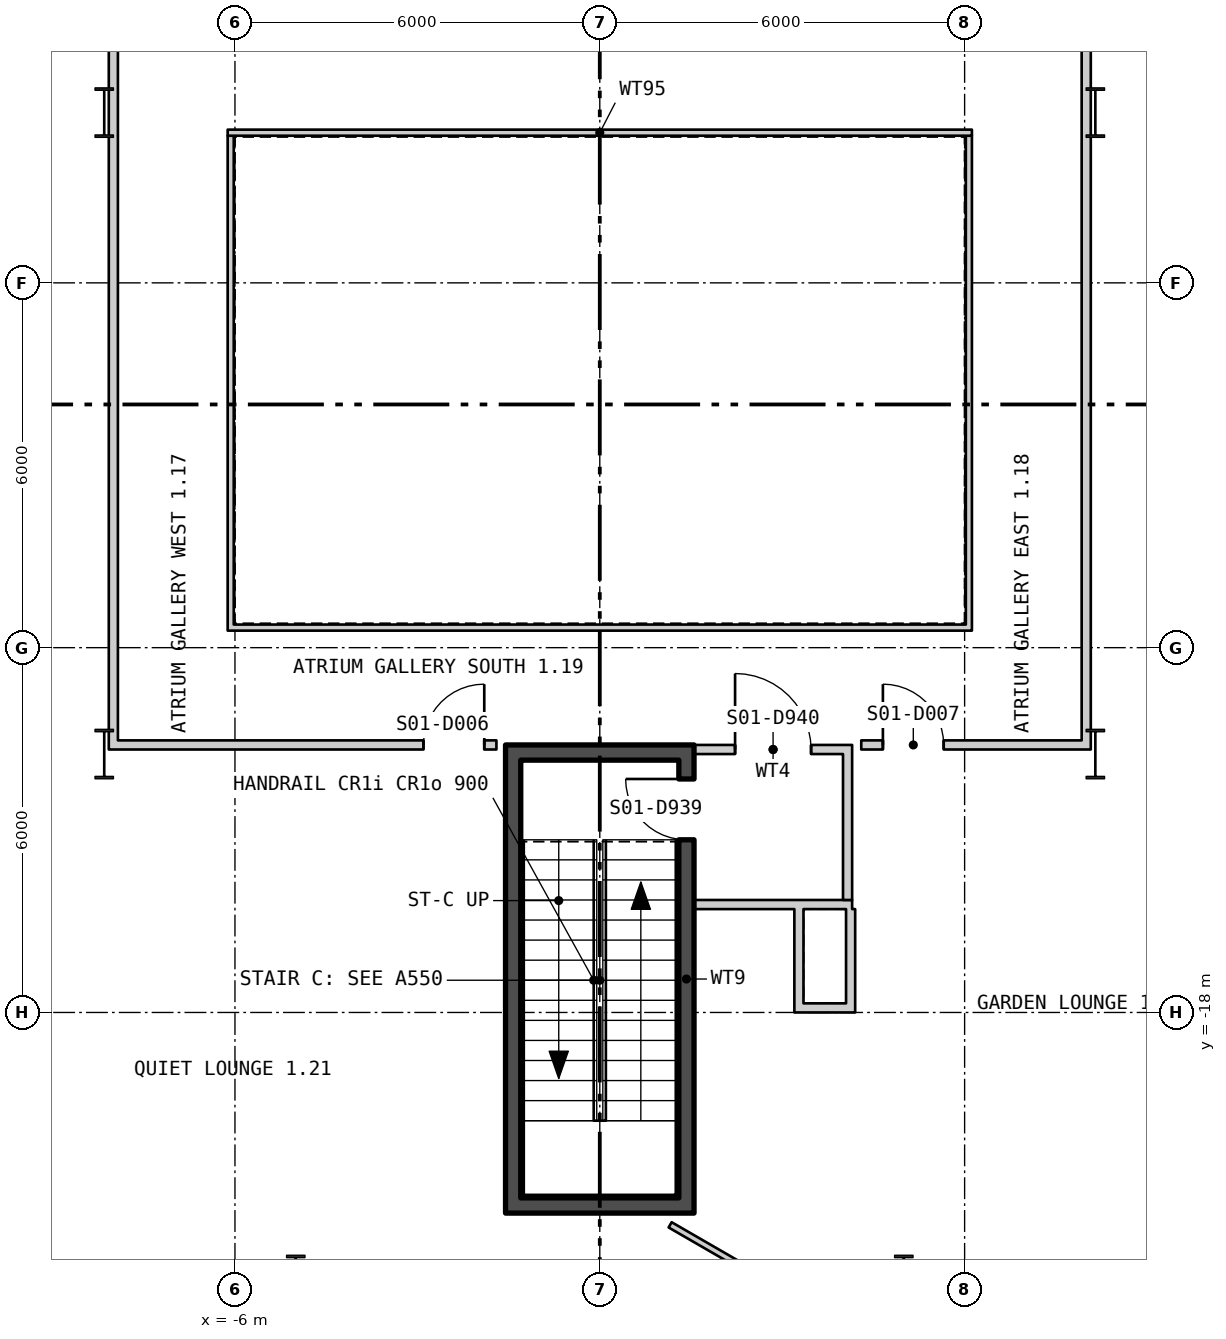
"""IFC4 building model, lengths in metres.
Left out: names, types, materials, properties, quantities, classifications, styles, units other than length and angle.
Written with IfcOpenShell. Run it as: python <this file> out.ifc"""

import sys

from ifc_helpers import new_model, si_unit, direction, frame, frame_2d, origin, origin_2d, place, context, subcontext, project, spatial, polyline, rectangle, i_section, outline, extrude, element, fill, save


model = new_model("IFC4")
c1 = context("Model", 3, precision=1e-05, world=origin(), true_north=direction((0.0, 1.0)))
c2 = subcontext(c1, "Body", "Model", "MODEL_VIEW")
j1 = project(units=[si_unit("LENGTHUNIT", "METRE"), si_unit("PLANEANGLEUNIT", "RADIAN")], contexts=[c1])
p1 = place(None, origin())
s1 = spatial("IfcSite", under=j1, at=p1, CompositionType="ELEMENT")
p2 = place(p1, origin())
s2 = spatial("IfcBuilding", under=s1, at=p2, CompositionType="ELEMENT")
p3 = place(p2, frame((0.0, 0.0, 28.8)))
s3 = spatial("IfcBuildingStorey", under=s2, at=p3, CompositionType="ELEMENT", Elevation=28.8)
for number, where, z_axis, x_axis in (
    (1, (8.15, -3.2, 0.0), (0.0, 0.0, 1.0), (1.0, 0.0, 0.0)),
    (2, (-8.15, -3.2, 0.0), (0.0, 0.0, 1.0), (1.0, 0.0, 0.0)),
    (3, (8.15, -13.75, 0.0), (0.0, 0.0, 1.0), (1.0, 0.0, 0.0)),
    (4, (-8.15, -13.75, 0.0), (0.0, 0.0, 1.0), (1.0, 0.0, 0.0)),
    (5, (5.0, -22.4, 0.0), (0.0, 0.0, 1.0), (1.0, 0.0, 0.0)),
    (6, (-5.0, -22.4, 0.0), (0.0, 0.0, 1.0), (1.0, 0.0, 0.0)),
):
    element("IfcColumn", number, at=place(p3, frame(where, z_axis=z_axis, x_axis=x_axis)), inside=s3, PredefinedType="COLUMN", context=c2, shape_type="SweptSolid", body=[
        extrude(i_section(OverallWidth=0.303, OverallDepth=0.814, WebThickness=0.021, FlangeThickness=0.04, at=origin_2d()), origin(), (0.0, 0.0, 1.0), 4.5),
    ])
p4 = place(p3, frame((-28.74, 9.808, -0.23), z_axis=(0.0, 0.0, 1.0), x_axis=(0.499999764979, -0.866025539474, 0.0)))
e7 = element("IfcWall", 7, at=p4, inside=s3, PredefinedType="SOLIDWALL", context=c2, shape_type="SweptSolid", body=[
    extrude(outline(polyline([(-0.13, -0.225), (45.87, -0.225), (45.61, 0.225), (0.13, 0.225), (-0.13, -0.225)])), origin(), (0.0, 0.0, 1.0), 4.55),
])
p5 = place(p4, frame((1.724, 0.0, 0.23)))
e8 = element("IfcOpeningElement", 8, at=p5, cuts=e7, PredefinedType="OPENING", context=c2, shape_type="SweptSolid", body=[
    extrude(rectangle(XDim=1.8, YDim=2.4, at=frame_2d((0.9, 1.2))), frame((0.0, 0.235, 0.0), z_axis=(0.0, -1.0, 0.0), x_axis=(1.0, 0.0, 0.0)), (0.0, 0.0, 1.0), 0.47),
])
p6 = place(p4, frame((5.893, 0.0, 1.13)))
e9 = element("IfcOpeningElement", 9, at=p6, cuts=e7, PredefinedType="OPENING", context=c2, shape_type="SweptSolid", body=[
    extrude(rectangle(XDim=2.4, YDim=2.6, at=frame_2d((1.2, 1.3))), frame((0.0, 0.235, 0.0), z_axis=(0.0, -1.0, 0.0), x_axis=(1.0, 0.0, 0.0)), (0.0, 0.0, 1.0), 0.47),
])
p7 = place(p4, frame((10.401, 0.0, 1.13)))
e10 = element("IfcOpeningElement", 10, at=p7, cuts=e7, PredefinedType="OPENING", context=c2, shape_type="SweptSolid", body=[
    extrude(rectangle(XDim=2.4, YDim=2.6, at=frame_2d((1.2, 1.3))), frame((0.0, 0.235, 0.0), z_axis=(0.0, -1.0, 0.0), x_axis=(1.0, 0.0, 0.0)), (0.0, 0.0, 1.0), 0.47),
])
p8 = place(p4, frame((14.909, 0.0, 1.13)))
e11 = element("IfcOpeningElement", 11, at=p8, cuts=e7, PredefinedType="OPENING", context=c2, shape_type="SweptSolid", body=[
    extrude(rectangle(XDim=2.4, YDim=2.6, at=frame_2d((1.2, 1.3))), frame((0.0, 0.235, 0.0), z_axis=(0.0, -1.0, 0.0), x_axis=(1.0, 0.0, 0.0)), (0.0, 0.0, 1.0), 0.47),
])
p9 = place(p4, frame((19.416, 0.0, 1.13)))
e12 = element("IfcOpeningElement", 12, at=p9, cuts=e7, PredefinedType="OPENING", context=c2, shape_type="SweptSolid", body=[
    extrude(rectangle(XDim=2.4, YDim=2.6, at=frame_2d((1.2, 1.3))), frame((0.0, 0.235, 0.0), z_axis=(0.0, -1.0, 0.0), x_axis=(1.0, 0.0, 0.0)), (0.0, 0.0, 1.0), 0.47),
])
p10 = place(p4, frame((23.924, 0.0, 1.13)))
e13 = element("IfcOpeningElement", 13, at=p10, cuts=e7, PredefinedType="OPENING", context=c2, shape_type="SweptSolid", body=[
    extrude(rectangle(XDim=2.4, YDim=2.6, at=frame_2d((1.2, 1.3))), frame((0.0, 0.235, 0.0), z_axis=(0.0, -1.0, 0.0), x_axis=(1.0, 0.0, 0.0)), (0.0, 0.0, 1.0), 0.47),
])
p11 = place(p4, frame((28.431, 0.0, 1.13)))
e14 = element("IfcOpeningElement", 14, at=p11, cuts=e7, PredefinedType="OPENING", context=c2, shape_type="SweptSolid", body=[
    extrude(rectangle(XDim=2.4, YDim=2.6, at=frame_2d((1.2, 1.3))), frame((0.0, 0.235, 0.0), z_axis=(0.0, -1.0, 0.0), x_axis=(1.0, 0.0, 0.0)), (0.0, 0.0, 1.0), 0.47),
])
p12 = place(p4, frame((33.239, 0.0, 0.23)))
e15 = element("IfcOpeningElement", 15, at=p12, cuts=e7, PredefinedType="OPENING", context=c2, shape_type="SweptSolid", body=[
    extrude(rectangle(XDim=1.8, YDim=2.4, at=frame_2d((0.9, 1.2))), frame((0.0, 0.235, 0.0), z_axis=(0.0, -1.0, 0.0), x_axis=(1.0, 0.0, 0.0)), (0.0, 0.0, 1.0), 0.47),
])
p13 = place(p4, frame((37.447, 0.0, 1.13)))
e16 = element("IfcOpeningElement", 16, at=p13, cuts=e7, PredefinedType="OPENING", context=c2, shape_type="SweptSolid", body=[
    extrude(rectangle(XDim=2.4, YDim=2.6, at=frame_2d((1.2, 1.3))), frame((0.0, 0.235, 0.0), z_axis=(0.0, -1.0, 0.0), x_axis=(1.0, 0.0, 0.0)), (0.0, 0.0, 1.0), 0.47),
])
p14 = place(p4, frame((41.916, 0.0, 1.13)))
e17 = element("IfcOpeningElement", 17, at=p14, cuts=e7, PredefinedType="OPENING", context=c2, shape_type="SweptSolid", body=[
    extrude(rectangle(XDim=2.4, YDim=2.6, at=frame_2d((1.2, 1.3))), frame((0.0, 0.235, 0.0), z_axis=(0.0, -1.0, 0.0), x_axis=(1.0, 0.0, 0.0)), (0.0, 0.0, 1.0), 0.47),
])
p15 = place(p3, frame((5.87, -29.805, -0.23), z_axis=(0.0, 0.0, 1.0), x_axis=(0.499999764979, 0.866025539474, 0.0)))
e18 = element("IfcWall", 18, at=p15, inside=s3, PredefinedType="SOLIDWALL", context=c2, shape_type="SweptSolid", body=[
    extrude(outline(polyline([(-0.13, -0.225), (45.87, -0.225), (45.61, 0.225), (0.13, 0.225), (-0.13, -0.225)])), origin(), (0.0, 0.0, 1.0), 4.55),
])
p16 = place(p15, frame((1.424, 0.0, 1.13)))
e19 = element("IfcOpeningElement", 19, at=p16, cuts=e18, PredefinedType="OPENING", context=c2, shape_type="SweptSolid", body=[
    extrude(rectangle(XDim=2.4, YDim=2.6, at=frame_2d((1.2, 1.3))), frame((0.0, 0.235, 0.0), z_axis=(0.0, -1.0, 0.0), x_axis=(1.0, 0.0, 0.0)), (0.0, 0.0, 1.0), 0.47),
])
p17 = place(p15, frame((5.893, 0.0, 1.13)))
e20 = element("IfcOpeningElement", 20, at=p17, cuts=e18, PredefinedType="OPENING", context=c2, shape_type="SweptSolid", body=[
    extrude(rectangle(XDim=2.4, YDim=2.6, at=frame_2d((1.2, 1.3))), frame((0.0, 0.235, 0.0), z_axis=(0.0, -1.0, 0.0), x_axis=(1.0, 0.0, 0.0)), (0.0, 0.0, 1.0), 0.47),
])
p18 = place(p15, frame((10.701, 0.0, 0.23)))
e21 = element("IfcOpeningElement", 21, at=p18, cuts=e18, PredefinedType="OPENING", context=c2, shape_type="SweptSolid", body=[
    extrude(rectangle(XDim=1.8, YDim=2.4, at=frame_2d((0.9, 1.2))), frame((0.0, 0.235, 0.0), z_axis=(0.0, -1.0, 0.0), x_axis=(1.0, 0.0, 0.0)), (0.0, 0.0, 1.0), 0.47),
])
p19 = place(p15, frame((14.909, 0.0, 1.13)))
e22 = element("IfcOpeningElement", 22, at=p19, cuts=e18, PredefinedType="OPENING", context=c2, shape_type="SweptSolid", body=[
    extrude(rectangle(XDim=2.4, YDim=2.6, at=frame_2d((1.2, 1.3))), frame((0.0, 0.235, 0.0), z_axis=(0.0, -1.0, 0.0), x_axis=(1.0, 0.0, 0.0)), (0.0, 0.0, 1.0), 0.47),
])
p20 = place(p15, frame((19.416, 0.0, 1.13)))
e23 = element("IfcOpeningElement", 23, at=p20, cuts=e18, PredefinedType="OPENING", context=c2, shape_type="SweptSolid", body=[
    extrude(rectangle(XDim=2.4, YDim=2.6, at=frame_2d((1.2, 1.3))), frame((0.0, 0.235, 0.0), z_axis=(0.0, -1.0, 0.0), x_axis=(1.0, 0.0, 0.0)), (0.0, 0.0, 1.0), 0.47),
])
p21 = place(p15, frame((23.924, 0.0, 1.13)))
e24 = element("IfcOpeningElement", 24, at=p21, cuts=e18, PredefinedType="OPENING", context=c2, shape_type="SweptSolid", body=[
    extrude(rectangle(XDim=2.4, YDim=2.6, at=frame_2d((1.2, 1.3))), frame((0.0, 0.235, 0.0), z_axis=(0.0, -1.0, 0.0), x_axis=(1.0, 0.0, 0.0)), (0.0, 0.0, 1.0), 0.47),
])
p22 = place(p15, frame((37.447, 0.0, 1.13)))
e25 = element("IfcOpeningElement", 25, at=p22, cuts=e18, PredefinedType="OPENING", context=c2, shape_type="SweptSolid", body=[
    extrude(rectangle(XDim=2.4, YDim=2.6, at=frame_2d((1.2, 1.3))), frame((0.0, 0.235, 0.0), z_axis=(0.0, -1.0, 0.0), x_axis=(1.0, 0.0, 0.0)), (0.0, 0.0, 1.0), 0.47),
])
p23 = place(p15, frame((42.216, 0.0, 0.23)))
e26 = element("IfcOpeningElement", 26, at=p23, cuts=e18, PredefinedType="OPENING", context=c2, shape_type="SweptSolid", body=[
    extrude(rectangle(XDim=1.8, YDim=2.4, at=frame_2d((0.9, 1.2))), frame((0.0, 0.235, 0.0), z_axis=(0.0, -1.0, 0.0), x_axis=(1.0, 0.0, 0.0)), (0.0, 0.0, 1.0), 0.47),
])
p24 = place(p3, frame((-6.12, -11.67, 0.0), z_axis=(0.0, 0.0, 1.0), x_axis=(1.0, 0.0, 0.0)))
e27 = element("IfcWall", 27, at=p24, inside=s3, PredefinedType="PARTITIONING", context=c2, shape_type="SweptSolid", body=[
    extrude(rectangle(XDim=12.24, YDim=0.1, at=frame_2d((6.12, 0.0))), origin(), (0.0, 0.0, 1.0), 4.3),
])
p25 = place(p3, frame((6.07, -11.62, 0.0), z_axis=(0.0, 0.0, 1.0), x_axis=(0.0, 1.0, 0.0)))
e28 = element("IfcWall", 28, at=p25, inside=s3, PredefinedType="PARTITIONING", context=c2, shape_type="SweptSolid", body=[
    extrude(rectangle(XDim=8.04, YDim=0.1, at=frame_2d((4.02, 0.0))), origin(), (0.0, 0.0, 1.0), 4.3),
])
p26 = place(p3, frame((6.12, -3.53, 0.0), z_axis=(0.0, 0.0, 1.0), x_axis=(-1.0, 0.0, 0.0)))
e29 = element("IfcWall", 29, at=p26, inside=s3, PredefinedType="PARTITIONING", context=c2, shape_type="SweptSolid", body=[
    extrude(rectangle(XDim=12.24, YDim=0.1, at=frame_2d((6.12, 0.0))), origin(), (0.0, 0.0, 1.0), 4.3),
])
p27 = place(p3, frame((-6.07, -3.58, 0.0), z_axis=(0.0, 0.0, 1.0), x_axis=(0.0, -1.0, 0.0)))
e30 = element("IfcWall", 30, at=p27, inside=s3, PredefinedType="PARTITIONING", context=c2, shape_type="SweptSolid", body=[
    extrude(rectangle(XDim=8.04, YDim=0.1, at=frame_2d((4.02, 0.0))), origin(), (0.0, 0.0, 1.0), 4.3),
])
p28 = place(p3, frame((-1.425, -21.05, 0.0), z_axis=(0.0, 0.0, 1.0), x_axis=(0.0, 1.0, 0.0)))
e31 = element("IfcWall", 31, at=p28, inside=s3, PredefinedType="SHEAR", context=c2, shape_type="SweptSolid", body=[
    extrude(rectangle(XDim=7.2, YDim=0.25, at=frame_2d((3.6, 0.0))), origin(), (0.0, 0.0, 1.0), 4.3),
])
p29 = place(p3, frame((1.425, -21.05, 0.0), z_axis=(0.0, 0.0, 1.0), x_axis=(0.0, 1.0, 0.0)))
e32 = element("IfcWall", 32, at=p29, inside=s3, PredefinedType="SHEAR", context=c2, shape_type="SweptSolid", body=[
    extrude(rectangle(XDim=7.2, YDim=0.25, at=frame_2d((3.6, 0.0))), origin(), (0.0, 0.0, 1.0), 4.3),
])
p30 = place(p29, frame((5.89, 0.0, 0.0)))
e33 = element("IfcOpeningElement", 33, at=p30, cuts=e32, PredefinedType="OPENING", context=c2, shape_type="SweptSolid", body=[
    extrude(rectangle(XDim=1.0, YDim=2.1, at=frame_2d((0.5, 1.05))), frame((0.0, 0.135, 0.0), z_axis=(0.0, -1.0, 0.0), x_axis=(1.0, 0.0, 0.0)), (0.0, 0.0, 1.0), 0.27),
])
for number, where, z_axis, x_axis in (
    (34, (-1.55, -21.175, 0.0), (0.0, 0.0, 1.0), (1.0, 0.0, 0.0)),
    (35, (-1.55, -13.725, 0.0), (0.0, 0.0, 1.0), (1.0, 0.0, 0.0)),
):
    element("IfcWall", number, at=place(p3, frame(where, z_axis=z_axis, x_axis=x_axis)), inside=s3, PredefinedType="SHEAR", context=c2, shape_type="SweptSolid", body=[
        extrude(rectangle(XDim=3.1, YDim=0.25, at=frame_2d((1.55, 0.0))), origin(), (0.0, 0.0, 1.0), 4.3),
    ])
p31 = place(p3, frame((1.55, -16.225, 0.0), z_axis=(0.0, 0.0, 1.0), x_axis=(1.0, 0.0, 0.0)))
e36 = element("IfcWall", 36, at=p31, inside=s3, PredefinedType="PARTITIONING", context=c2, shape_type="SweptSolid", body=[
    extrude(rectangle(XDim=2.6, YDim=0.15, at=frame_2d((1.3, 0.0))), origin(), (0.0, 0.0, 1.0), 4.3),
])
p32 = place(p3, frame((4.075, -16.15, 0.0), z_axis=(0.0, 0.0, 1.0), x_axis=(0.0, 1.0, 0.0)))
e37 = element("IfcWall", 37, at=p32, inside=s3, PredefinedType="PARTITIONING", context=c2, shape_type="SweptSolid", body=[
    extrude(rectangle(XDim=2.4, YDim=0.15, at=frame_2d((1.2, 0.0))), origin(), (0.0, 0.0, 1.0), 4.3),
])
p33 = place(p3, frame((1.55, -13.675, 0.0), z_axis=(0.0, 0.0, 1.0), x_axis=(1.0, 0.0, 0.0)))
e38 = element("IfcWall", 38, at=p33, inside=s3, PredefinedType="PARTITIONING", context=c2, shape_type="SweptSolid", body=[
    extrude(rectangle(XDim=2.6, YDim=0.15, at=frame_2d((1.3, 0.0))), origin(), (0.0, 0.0, 1.0), 3.39),
])
p34 = place(p33, frame((0.675, 0.0, 0.0)))
e39 = element("IfcOpeningElement", 39, at=p34, cuts=e38, PredefinedType="OPENING", context=c2, shape_type="SweptSolid", body=[
    extrude(rectangle(XDim=1.25, YDim=2.1, at=frame_2d((0.625, 1.05))), frame((0.0, 0.085, 0.0), z_axis=(0.0, -1.0, 0.0), x_axis=(1.0, 0.0, 0.0)), (0.0, 0.0, 1.0), 0.17),
])
p35 = place(p3, frame((3.275, -18.0, 0.0), z_axis=(0.0, 0.0, 1.0), x_axis=(0.0, 1.0, 0.0)))
e40 = element("IfcWall", 40, at=p35, inside=s3, PredefinedType="PARTITIONING", context=c2, shape_type="SweptSolid", body=[
    extrude(rectangle(XDim=1.7, YDim=0.15, at=frame_2d((0.85, 0.0))), origin(), (0.0, 0.0, 1.0), 3.7),
])
p36 = place(p3, frame((3.35, -17.925, 0.0), z_axis=(0.0, 0.0, 1.0), x_axis=(1.0, 0.0, 0.0)))
e41 = element("IfcWall", 41, at=p36, inside=s3, PredefinedType="PARTITIONING", context=c2, shape_type="SweptSolid", body=[
    extrude(rectangle(XDim=0.7, YDim=0.15, at=frame_2d((0.35, 0.0))), origin(), (0.0, 0.0, 1.0), 4.3),
])
p37 = place(p3, frame((4.125, -18.0, 0.0), z_axis=(0.0, 0.0, 1.0), x_axis=(0.0, 1.0, 0.0)))
e42 = element("IfcWall", 42, at=p37, inside=s3, PredefinedType="PARTITIONING", context=c2, shape_type="SweptSolid", body=[
    extrude(rectangle(XDim=1.7, YDim=0.15, at=frame_2d((0.85, 0.0))), origin(), (0.0, 0.0, 1.0), 4.3),
])
p38 = place(p3, frame((-8.0, -13.675, 0.0), z_axis=(0.0, 0.0, 1.0), x_axis=(0.0, 1.0, 0.0)))
e43 = element("IfcWall", 43, at=p38, inside=s3, PredefinedType="PARTITIONING", context=c2, shape_type="SweptSolid", body=[
    extrude(rectangle(XDim=10.475, YDim=0.15, at=frame_2d((5.237, 0.0))), origin(), (0.0, 0.0, 1.0), 3.61),
])
p39 = place(p3, frame((-8.0, -3.2, 0.0), z_axis=(0.0, 0.0, 1.0), x_axis=(0.0, 1.0, 0.0)))
e44 = element("IfcWall", 44, at=p39, inside=s3, PredefinedType="PARTITIONING", context=c2, shape_type="SweptSolid", body=[
    extrude(rectangle(XDim=1.411, YDim=0.15, at=frame_2d((0.706, 0.0))), origin(), (0.0, 0.0, 1.0), 4.3),
])
p40 = place(p3, frame((-7.925, -13.6, 0.0), z_axis=(0.0, 0.0, 1.0), x_axis=(1.0, 0.0, 0.0)))
e45 = element("IfcWall", 45, at=p40, inside=s3, PredefinedType="PARTITIONING", context=c2, shape_type="SweptSolid", body=[
    extrude(rectangle(XDim=6.225, YDim=0.15, at=frame_2d((3.112, 0.0))), origin(), (0.0, 0.0, 1.0), 3.39),
])
p41 = place(p40, frame((5.025, 0.0, 0.0)))
e46 = element("IfcOpeningElement", 46, at=p41, cuts=e45, PredefinedType="OPENING", context=c2, shape_type="SweptSolid", body=[
    extrude(rectangle(XDim=1.0, YDim=2.1, at=frame_2d((0.5, 1.05))), frame((0.0, 0.085, 0.0), z_axis=(0.0, -1.0, 0.0), x_axis=(1.0, 0.0, 0.0)), (0.0, 0.0, 1.0), 0.17),
])
p42 = place(p3, frame((1.157, -21.493, 0.0), z_axis=(0.0, 0.0, 1.0), x_axis=(0.865881620636, -0.500248957066, 0.0)))
e47 = element("IfcWall", 47, at=p42, inside=s3, PredefinedType="PARTITIONING", context=c2, shape_type="SweptSolid", body=[
    extrude(rectangle(XDim=7.562, YDim=0.1, at=frame_2d((3.781, 0.0))), origin(), (0.0, 0.0, 1.0), 4.3),
])
p43 = place(p3, frame((4.3, -13.6, 0.0), z_axis=(0.0, 0.0, 1.0), x_axis=(1.0, 0.0, 0.0)))
e48 = element("IfcWall", 48, at=p43, inside=s3, PredefinedType="PARTITIONING", context=c2, shape_type="SweptSolid", body=[
    extrude(rectangle(XDim=3.625, YDim=0.15, at=frame_2d((1.812, 0.0))), origin(), (0.0, 0.0, 1.0), 3.39),
])
p44 = place(p43, frame((0.356, 0.0, 0.0)))
e49 = element("IfcOpeningElement", 49, at=p44, cuts=e48, PredefinedType="OPENING", context=c2, shape_type="SweptSolid", body=[
    extrude(rectangle(XDim=1.0, YDim=2.1, at=frame_2d((0.5, 1.05))), frame((0.0, 0.085, 0.0), z_axis=(0.0, -1.0, 0.0), x_axis=(1.0, 0.0, 0.0)), (0.0, 0.0, 1.0), 0.17),
])
p45 = place(p3, frame((8.0, -13.675, 0.0), z_axis=(0.0, 0.0, 1.0), x_axis=(0.0, 1.0, 0.0)))
e50 = element("IfcWall", 50, at=p45, inside=s3, PredefinedType="PARTITIONING", context=c2, shape_type="SweptSolid", body=[
    extrude(rectangle(XDim=10.475, YDim=0.15, at=frame_2d((5.237, 0.0))), origin(), (0.0, 0.0, 1.0), 3.61),
])
p46 = place(p3, frame((8.0, -3.2, 0.0), z_axis=(0.0, 0.0, 1.0), x_axis=(0.0, 1.0, 0.0)))
e51 = element("IfcWall", 51, at=p46, inside=s3, PredefinedType="PARTITIONING", context=c2, shape_type="SweptSolid", body=[
    extrude(rectangle(XDim=1.411, YDim=0.15, at=frame_2d((0.706, 0.0))), origin(), (0.0, 0.0, 1.0), 4.3),
])
p47 = place(p30, origin())
e52 = element("IfcDoor", 52, at=p47, inside=s3, OperationType="SINGLE_SWING_LEFT", PredefinedType="DOOR", context=c2, shape_type="SweptSolid", body=[
    extrude(rectangle(XDim=1.0, YDim=2.1, at=frame_2d((0.5, 1.05))), frame((0.0, 0.025, 0.0), z_axis=(0.0, -1.0, 0.0), x_axis=(1.0, 0.0, 0.0)), (0.0, 0.0, 1.0), 0.05),
])
fill(e33, e52)
p48 = place(p34, origin())
e53 = element("IfcDoor", 53, at=p48, inside=s3, OperationType="SINGLE_SWING_RIGHT", PredefinedType="DOOR", context=c2, shape_type="SweptSolid", body=[
    extrude(rectangle(XDim=1.25, YDim=2.1, at=frame_2d((0.625, 1.05))), frame((0.0, 0.025, 0.0), z_axis=(0.0, -1.0, 0.0), x_axis=(1.0, 0.0, 0.0)), (0.0, 0.0, 1.0), 0.05),
])
fill(e39, e53)
p49 = place(p41, origin())
e54 = element("IfcDoor", 54, at=p49, inside=s3, OperationType="SINGLE_SWING_LEFT", PredefinedType="DOOR", context=c2, shape_type="SweptSolid", body=[
    extrude(rectangle(XDim=1.0, YDim=2.1, at=frame_2d((0.5, 1.05))), frame((0.0, 0.025, 0.0), z_axis=(0.0, -1.0, 0.0), x_axis=(1.0, 0.0, 0.0)), (0.0, 0.0, 1.0), 0.05),
])
fill(e46, e54)
p50 = place(p44, origin())
e55 = element("IfcDoor", 55, at=p50, inside=s3, OperationType="SINGLE_SWING_RIGHT", PredefinedType="DOOR", context=c2, shape_type="SweptSolid", body=[
    extrude(rectangle(XDim=1.0, YDim=2.1, at=frame_2d((0.5, 1.05))), frame((0.0, 0.025, 0.0), z_axis=(0.0, -1.0, 0.0), x_axis=(1.0, 0.0, 0.0)), (0.0, 0.0, 1.0), 0.05),
])
fill(e49, e55)
save(model, sys.argv[1])
